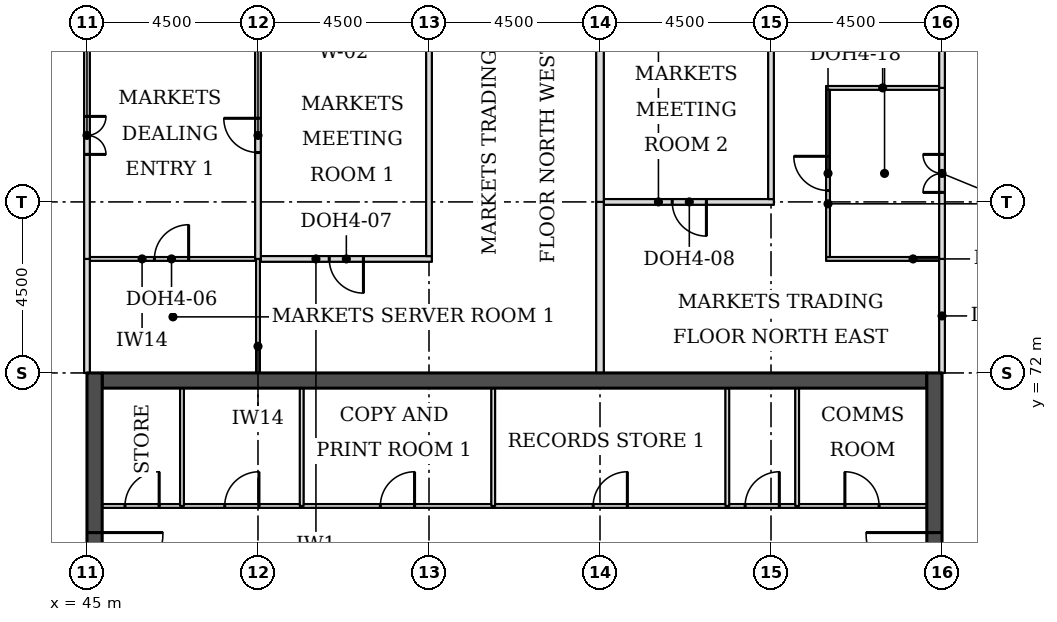
"""IFC4 building model, lengths in metres.
Left out: names, types, materials, properties, quantities, classifications, styles, units other than length and angle.
Written with IfcOpenShell. Run it as: python <this file> out.ifc"""

import sys

from ifc_helpers import new_model, si_unit, direction, frame, frame_2d, origin, place, context, subcontext, project, spatial, rectangle, extrude, element, fill, save


model = new_model("IFC4")
c1 = context("Model", 3, precision=1e-05, world=origin(), true_north=direction((0.0, 1.0)))
c2 = subcontext(c1, "Body", "Model", "MODEL_VIEW")
j1 = project(units=[si_unit("LENGTHUNIT", "METRE"), si_unit("PLANEANGLEUNIT", "RADIAN")], contexts=[c1])
p1 = place(None, origin())
s1 = spatial("IfcSite", under=j1, at=p1, CompositionType="ELEMENT")
p2 = place(p1, origin())
s2 = spatial("IfcBuilding", under=s1, at=p2, CompositionType="ELEMENT")
p3 = place(p2, frame((0.0, 0.0, 173.6)))
s3 = spatial("IfcBuildingStorey", under=s2, at=p3, CompositionType="ELEMENT", Elevation=173.6)
p4 = place(p3, frame((45.4, 71.8, 0.0), z_axis=(0.0, 0.0, 1.0), x_axis=(1.0, 0.0, 0.0)))
e1 = element("IfcWall", 1, at=p4, inside=s3, PredefinedType="SHEAR", context=c2, shape_type="SweptSolid", body=[
    extrude(rectangle(XDim=21.7, YDim=0.4, at=frame_2d((10.85, 0.0))), origin(), (0.0, 0.0, 1.0), 3.7),
])
p5 = place(p3, frame((45.2, 49.5, 0.0), z_axis=(0.0, 0.0, 1.0), x_axis=(0.0, 1.0, 0.0)))
e2 = element("IfcWall", 2, at=p5, inside=s3, PredefinedType="SHEAR", context=c2, shape_type="SweptSolid", body=[
    extrude(rectangle(XDim=22.5, YDim=0.4, at=frame_2d((11.25, 0.0))), origin(), (0.0, 0.0, 1.0), 3.7),
])
p6 = place(p5, frame((4.2, 0.0, 0.0)))
e3 = element("IfcOpeningElement", 3, at=p6, cuts=e2, PredefinedType="OPENING", context=c2, shape_type="SweptSolid", body=[
    extrude(rectangle(XDim=1.8, YDim=2.1, at=frame_2d((0.9, 1.05))), frame((0.0, 0.21, 0.0), z_axis=(0.0, -1.0, 0.0), x_axis=(1.0, 0.0, 0.0)), (0.0, 0.0, 1.0), 0.42),
])
p7 = place(p5, frame((6.9, 0.0, 0.0)))
e4 = element("IfcOpeningElement", 4, at=p7, cuts=e2, PredefinedType="OPENING", context=c2, shape_type="SweptSolid", body=[
    extrude(rectangle(XDim=1.1, YDim=2.1, at=frame_2d((0.55, 1.05))), frame((0.0, 0.21, 0.0), z_axis=(0.0, -1.0, 0.0), x_axis=(1.0, 0.0, 0.0)), (0.0, 0.0, 1.0), 0.42),
])
p8 = place(p5, frame((13.6, 0.0, 0.0)))
e5 = element("IfcOpeningElement", 5, at=p8, cuts=e2, PredefinedType="OPENING", context=c2, shape_type="SweptSolid", body=[
    extrude(rectangle(XDim=1.1, YDim=2.1, at=frame_2d((0.55, 1.05))), frame((0.0, 0.21, 0.0), z_axis=(0.0, -1.0, 0.0), x_axis=(1.0, 0.0, 0.0)), (0.0, 0.0, 1.0), 0.42),
])
p9 = place(p5, frame((16.5, 0.0, 0.0)))
e6 = element("IfcOpeningElement", 6, at=p9, cuts=e2, PredefinedType="OPENING", context=c2, shape_type="SweptSolid", body=[
    extrude(rectangle(XDim=1.8, YDim=2.1, at=frame_2d((0.9, 1.05))), frame((0.0, 0.21, 0.0), z_axis=(0.0, -1.0, 0.0), x_axis=(1.0, 0.0, 0.0)), (0.0, 0.0, 1.0), 0.42),
])
p10 = place(p3, frame((67.3, 49.5, 0.0), z_axis=(0.0, 0.0, 1.0), x_axis=(0.0, 1.0, 0.0)))
e7 = element("IfcWall", 7, at=p10, inside=s3, PredefinedType="SHEAR", context=c2, shape_type="SweptSolid", body=[
    extrude(rectangle(XDim=22.5, YDim=0.4, at=frame_2d((11.25, 0.0))), origin(), (0.0, 0.0, 1.0), 3.7),
])
p11 = place(p10, frame((4.2, 0.0, 0.0)))
e8 = element("IfcOpeningElement", 8, at=p11, cuts=e7, PredefinedType="OPENING", context=c2, shape_type="SweptSolid", body=[
    extrude(rectangle(XDim=1.8, YDim=2.1, at=frame_2d((0.9, 1.05))), frame((0.0, 0.21, 0.0), z_axis=(0.0, -1.0, 0.0), x_axis=(1.0, 0.0, 0.0)), (0.0, 0.0, 1.0), 0.42),
])
p12 = place(p10, frame((6.9, 0.0, 0.0)))
e9 = element("IfcOpeningElement", 9, at=p12, cuts=e7, PredefinedType="OPENING", context=c2, shape_type="SweptSolid", body=[
    extrude(rectangle(XDim=1.1, YDim=2.1, at=frame_2d((0.55, 1.05))), frame((0.0, 0.21, 0.0), z_axis=(0.0, -1.0, 0.0), x_axis=(1.0, 0.0, 0.0)), (0.0, 0.0, 1.0), 0.42),
])
p13 = place(p10, frame((13.6, 0.0, 0.0)))
e10 = element("IfcOpeningElement", 10, at=p13, cuts=e7, PredefinedType="OPENING", context=c2, shape_type="SweptSolid", body=[
    extrude(rectangle(XDim=1.1, YDim=2.1, at=frame_2d((0.55, 1.05))), frame((0.0, 0.21, 0.0), z_axis=(0.0, -1.0, 0.0), x_axis=(1.0, 0.0, 0.0)), (0.0, 0.0, 1.0), 0.42),
])
p14 = place(p10, frame((16.5, 0.0, 0.0)))
e11 = element("IfcOpeningElement", 11, at=p14, cuts=e7, PredefinedType="OPENING", context=c2, shape_type="SweptSolid", body=[
    extrude(rectangle(XDim=1.8, YDim=2.1, at=frame_2d((0.9, 1.05))), frame((0.0, 0.21, 0.0), z_axis=(0.0, -1.0, 0.0), x_axis=(1.0, 0.0, 0.0)), (0.0, 0.0, 1.0), 0.42),
])
p15 = place(p3, frame((45.075, 75.0, 0.0), z_axis=(0.0, 0.0, 1.0), x_axis=(1.0, 0.0, 0.0)))
e12 = element("IfcWall", 12, at=p15, inside=s3, PredefinedType="PARTITIONING", context=c2, shape_type="SweptSolid", body=[
    extrude(rectangle(XDim=4.35, YDim=0.1, at=frame_2d((2.175, 0.0))), origin(), (0.0, 0.0, 1.0), 3.55),
])
p16 = place(p15, frame((1.7, 0.0, 0.0)))
e13 = element("IfcOpeningElement", 13, at=p16, cuts=e12, PredefinedType="OPENING", context=c2, shape_type="SweptSolid", body=[
    extrude(rectangle(XDim=0.9, YDim=2.1, at=frame_2d((0.45, 1.05))), frame((0.0, 0.06, 0.0), z_axis=(0.0, -1.0, 0.0), x_axis=(1.0, 0.0, 0.0)), (0.0, 0.0, 1.0), 0.12),
])
p17 = place(p3, frame((49.575, 75.0, 0.0), z_axis=(0.0, 0.0, 1.0), x_axis=(1.0, 0.0, 0.0)))
e14 = element("IfcWall", 14, at=p17, inside=s3, PredefinedType="PARTITIONING", context=c2, shape_type="SweptSolid", body=[
    extrude(rectangle(XDim=4.5, YDim=0.15, at=frame_2d((2.25, 0.0))), origin(), (0.0, 0.0, 1.0), 3.55),
])
p18 = place(p17, frame((1.8, 0.0, 0.0)))
e15 = element("IfcOpeningElement", 15, at=p18, cuts=e14, PredefinedType="OPENING", context=c2, shape_type="SweptSolid", body=[
    extrude(rectangle(XDim=0.9, YDim=2.1, at=frame_2d((0.45, 1.05))), frame((0.0, 0.085, 0.0), z_axis=(0.0, -1.0, 0.0), x_axis=(1.0, 0.0, 0.0)), (0.0, 0.0, 1.0), 0.17),
])
p19 = place(p3, frame((64.45, 75.0, 0.0), z_axis=(0.0, 0.0, 1.0), x_axis=(1.0, 0.0, 0.0)))
e16 = element("IfcWall", 16, at=p19, inside=s3, PredefinedType="PARTITIONING", context=c2, shape_type="SweptSolid", body=[
    extrude(rectangle(XDim=2.975, YDim=0.1, at=frame_2d((1.488, 0.0))), origin(), (0.0, 0.0, 1.0), 3.55),
])
p20 = place(p3, frame((58.6, 76.5, 0.0), z_axis=(0.0, 0.0, 1.0), x_axis=(1.0, 0.0, 0.0)))
e17 = element("IfcWall", 17, at=p20, inside=s3, PredefinedType="PARTITIONING", context=c2, shape_type="SweptSolid", body=[
    extrude(rectangle(XDim=4.475, YDim=0.15, at=frame_2d((2.237, 0.0))), origin(), (0.0, 0.0, 1.0), 3.55),
])
p21 = place(p20, frame((1.8, 0.0, 0.0)))
e18 = element("IfcOpeningElement", 18, at=p21, cuts=e17, PredefinedType="OPENING", context=c2, shape_type="SweptSolid", body=[
    extrude(rectangle(XDim=0.9, YDim=2.1, at=frame_2d((0.45, 1.05))), frame((0.0, 0.085, 0.0), z_axis=(0.0, -1.0, 0.0), x_axis=(1.0, 0.0, 0.0)), (0.0, 0.0, 1.0), 0.17),
])
p22 = place(p3, frame((64.45, 79.5, 0.0), z_axis=(0.0, 0.0, 1.0), x_axis=(1.0, 0.0, 0.0)))
e19 = element("IfcWall", 19, at=p22, inside=s3, PredefinedType="PARTITIONING", context=c2, shape_type="SweptSolid", body=[
    extrude(rectangle(XDim=2.975, YDim=0.1, at=frame_2d((1.488, 0.0))), origin(), (0.0, 0.0, 1.0), 3.55),
])
p23 = place(p3, frame((45.0, 72.0, 0.0), z_axis=(0.0, 0.0, 1.0), x_axis=(0.0, 1.0, 0.0)))
e20 = element("IfcWall", 20, at=p23, inside=s3, PredefinedType="PARTITIONING", context=c2, shape_type="SweptSolid", body=[
    extrude(rectangle(XDim=3.0, YDim=0.15, at=frame_2d((1.5, 0.0))), origin(), (0.0, 0.0, 1.0), 3.022),
])
p24 = place(p3, frame((49.5, 72.0, 0.0), z_axis=(0.0, 0.0, 1.0), x_axis=(0.0, 1.0, 0.0)))
e21 = element("IfcWall", 21, at=p24, inside=s3, PredefinedType="PARTITIONING", context=c2, shape_type="SweptSolid", body=[
    extrude(rectangle(XDim=3.0, YDim=0.1, at=frame_2d((1.5, 0.0))), origin(), (0.0, 0.0, 1.0), 3.55),
])
p25 = place(p3, frame((58.5, 72.0, 0.0), z_axis=(0.0, 0.0, 1.0), x_axis=(0.0, 1.0, 0.0)))
e22 = element("IfcWall", 22, at=p25, inside=s3, PredefinedType="PARTITIONING", context=c2, shape_type="SweptSolid", body=[
    extrude(rectangle(XDim=4.5, YDim=0.2, at=frame_2d((2.25, 0.0))), origin(), (0.0, 0.0, 1.0), 3.55),
])
p26 = place(p3, frame((67.5, 72.0, 0.0), z_axis=(0.0, 0.0, 1.0), x_axis=(0.0, 1.0, 0.0)))
e23 = element("IfcWall", 23, at=p26, inside=s3, PredefinedType="PARTITIONING", context=c2, shape_type="SweptSolid", body=[
    extrude(rectangle(XDim=3.0, YDim=0.15, at=frame_2d((1.5, 0.0))), origin(), (0.0, 0.0, 1.0), 3.022),
])
p27 = place(p3, frame((45.0, 75.0, 0.0), z_axis=(0.0, 0.0, 1.0), x_axis=(0.0, 1.0, 0.0)))
e24 = element("IfcWall", 24, at=p27, inside=s3, PredefinedType="PARTITIONING", context=c2, shape_type="SweptSolid", body=[
    extrude(rectangle(XDim=6.45, YDim=0.15, at=frame_2d((3.225, 0.0))), origin(), (0.0, 0.0, 1.0), 3.022),
])
p28 = place(p27, frame((2.75, 0.0, 0.0)))
e25 = element("IfcOpeningElement", 25, at=p28, cuts=e24, PredefinedType="OPENING", context=c2, shape_type="SweptSolid", body=[
    extrude(rectangle(XDim=1.0, YDim=2.1, at=frame_2d((0.5, 1.05))), frame((0.0, 0.085, 0.0), z_axis=(0.0, -1.0, 0.0), x_axis=(1.0, 0.0, 0.0)), (0.0, 0.0, 1.0), 0.17),
])
p29 = place(p3, frame((49.5, 75.0, 0.0), z_axis=(0.0, 0.0, 1.0), x_axis=(0.0, 1.0, 0.0)))
e26 = element("IfcWall", 26, at=p29, inside=s3, PredefinedType="PARTITIONING", context=c2, shape_type="SweptSolid", body=[
    extrude(rectangle(XDim=6.45, YDim=0.15, at=frame_2d((3.225, 0.0))), origin(), (0.0, 0.0, 1.0), 3.55),
])
p30 = place(p29, frame((2.8, 0.0, 0.0)))
e27 = element("IfcOpeningElement", 27, at=p30, cuts=e26, PredefinedType="OPENING", context=c2, shape_type="SweptSolid", body=[
    extrude(rectangle(XDim=0.9, YDim=2.1, at=frame_2d((0.45, 1.05))), frame((0.0, 0.085, 0.0), z_axis=(0.0, -1.0, 0.0), x_axis=(1.0, 0.0, 0.0)), (0.0, 0.0, 1.0), 0.17),
])
p31 = place(p3, frame((67.5, 75.0, 0.0), z_axis=(0.0, 0.0, 1.0), x_axis=(0.0, 1.0, 0.0)))
e28 = element("IfcWall", 28, at=p31, inside=s3, PredefinedType="PARTITIONING", context=c2, shape_type="SweptSolid", body=[
    extrude(rectangle(XDim=4.5, YDim=0.15, at=frame_2d((2.25, 0.0))), origin(), (0.0, 0.0, 1.0), 3.022),
])
p32 = place(p31, frame((1.75, 0.0, 0.0)))
e29 = element("IfcOpeningElement", 29, at=p32, cuts=e28, PredefinedType="OPENING", context=c2, shape_type="SweptSolid", body=[
    extrude(rectangle(XDim=1.0, YDim=2.1, at=frame_2d((0.5, 1.05))), frame((0.0, 0.085, 0.0), z_axis=(0.0, -1.0, 0.0), x_axis=(1.0, 0.0, 0.0)), (0.0, 0.0, 1.0), 0.17),
])
p33 = place(p3, frame((64.5, 75.05, 0.0), z_axis=(0.0, 0.0, 1.0), x_axis=(0.0, 1.0, 0.0)))
e30 = element("IfcWall", 30, at=p33, inside=s3, PredefinedType="PARTITIONING", context=c2, shape_type="SweptSolid", body=[
    extrude(rectangle(XDim=4.4, YDim=0.1, at=frame_2d((2.2, 0.0))), origin(), (0.0, 0.0, 1.0), 3.55),
])
p34 = place(p33, frame((1.75, 0.0, 0.0)))
e31 = element("IfcOpeningElement", 31, at=p34, cuts=e30, PredefinedType="OPENING", context=c2, shape_type="SweptSolid", body=[
    extrude(rectangle(XDim=0.9, YDim=2.1, at=frame_2d((0.45, 1.05))), frame((0.0, 0.06, 0.0), z_axis=(0.0, -1.0, 0.0), x_axis=(1.0, 0.0, 0.0)), (0.0, 0.0, 1.0), 0.12),
])
p35 = place(p3, frame((54.0, 75.075, 0.0), z_axis=(0.0, 0.0, 1.0), x_axis=(0.0, 1.0, 0.0)))
e32 = element("IfcWall", 32, at=p35, inside=s3, PredefinedType="PARTITIONING", context=c2, shape_type="SweptSolid", body=[
    extrude(rectangle(XDim=6.375, YDim=0.15, at=frame_2d((3.188, 0.0))), origin(), (0.0, 0.0, 1.0), 3.55),
])
p36 = place(p3, frame((58.5, 76.5, 0.0), z_axis=(0.0, 0.0, 1.0), x_axis=(0.0, 1.0, 0.0)))
e33 = element("IfcWall", 33, at=p36, inside=s3, PredefinedType="PARTITIONING", context=c2, shape_type="SweptSolid", body=[
    extrude(rectangle(XDim=4.95, YDim=0.2, at=frame_2d((2.475, 0.0))), origin(), (0.0, 0.0, 1.0), 3.55),
])
p37 = place(p3, frame((63.0, 76.575, 0.0), z_axis=(0.0, 0.0, 1.0), x_axis=(0.0, 1.0, 0.0)))
e34 = element("IfcWall", 34, at=p37, inside=s3, PredefinedType="PARTITIONING", context=c2, shape_type="SweptSolid", body=[
    extrude(rectangle(XDim=4.875, YDim=0.15, at=frame_2d((2.438, 0.0))), origin(), (0.0, 0.0, 1.0), 3.55),
])
p38 = place(p3, frame((67.5, 79.5, 0.0), z_axis=(0.0, 0.0, 1.0), x_axis=(0.0, 1.0, 0.0)))
e35 = element("IfcWall", 35, at=p38, inside=s3, PredefinedType="PARTITIONING", context=c2, shape_type="SweptSolid", body=[
    extrude(rectangle(XDim=1.95, YDim=0.15, at=frame_2d((0.975, 0.0))), origin(), (0.0, 0.0, 1.0), 3.022),
])
p39 = place(p3, frame((45.4, 68.5, 0.0), z_axis=(0.0, 0.0, 1.0), x_axis=(1.0, 0.0, 0.0)))
e36 = element("IfcWall", 36, at=p39, inside=s3, PredefinedType="PARTITIONING", context=c2, shape_type="SweptSolid", body=[
    extrude(rectangle(XDim=21.7, YDim=0.1, at=frame_2d((10.85, 0.0))), origin(), (0.0, 0.0, 1.0), 3.55),
])
p40 = place(p39, frame((19.544, 0.0, 0.0)))
e37 = element("IfcOpeningElement", 37, at=p40, cuts=e36, PredefinedType="OPENING", context=c2, shape_type="SweptSolid", body=[
    extrude(rectangle(XDim=0.9, YDim=2.1, at=frame_2d((0.45, 1.05))), frame((0.0, 0.06, 0.0), z_axis=(0.0, -1.0, 0.0), x_axis=(1.0, 0.0, 0.0)), (0.0, 0.0, 1.0), 0.12),
])
p41 = place(p39, frame((16.919, 0.0, 0.0)))
e38 = element("IfcOpeningElement", 38, at=p41, cuts=e36, PredefinedType="OPENING", context=c2, shape_type="SweptSolid", body=[
    extrude(rectangle(XDim=0.9, YDim=2.1, at=frame_2d((0.45, 1.05))), frame((0.0, 0.06, 0.0), z_axis=(0.0, -1.0, 0.0), x_axis=(1.0, 0.0, 0.0)), (0.0, 0.0, 1.0), 0.12),
])
p42 = place(p39, frame((0.6, 0.0, 0.0)))
e39 = element("IfcOpeningElement", 39, at=p42, cuts=e36, PredefinedType="OPENING", context=c2, shape_type="SweptSolid", body=[
    extrude(rectangle(XDim=0.9, YDim=2.1, at=frame_2d((0.45, 1.05))), frame((0.0, 0.06, 0.0), z_axis=(0.0, -1.0, 0.0), x_axis=(1.0, 0.0, 0.0)), (0.0, 0.0, 1.0), 0.12),
])
p43 = place(p39, frame((3.225, 0.0, 0.0)))
e40 = element("IfcOpeningElement", 40, at=p43, cuts=e36, PredefinedType="OPENING", context=c2, shape_type="SweptSolid", body=[
    extrude(rectangle(XDim=0.9, YDim=2.1, at=frame_2d((0.45, 1.05))), frame((0.0, 0.06, 0.0), z_axis=(0.0, -1.0, 0.0), x_axis=(1.0, 0.0, 0.0)), (0.0, 0.0, 1.0), 0.12),
])
p44 = place(p39, frame((12.92, 0.0, 0.0)))
e41 = element("IfcOpeningElement", 41, at=p44, cuts=e36, PredefinedType="OPENING", context=c2, shape_type="SweptSolid", body=[
    extrude(rectangle(XDim=0.9, YDim=2.1, at=frame_2d((0.45, 1.05))), frame((0.0, 0.06, 0.0), z_axis=(0.0, -1.0, 0.0), x_axis=(1.0, 0.0, 0.0)), (0.0, 0.0, 1.0), 0.12),
])
p45 = place(p39, frame((7.32, 0.0, 0.0)))
e42 = element("IfcOpeningElement", 42, at=p45, cuts=e36, PredefinedType="OPENING", context=c2, shape_type="SweptSolid", body=[
    extrude(rectangle(XDim=0.9, YDim=2.1, at=frame_2d((0.45, 1.05))), frame((0.0, 0.06, 0.0), z_axis=(0.0, -1.0, 0.0), x_axis=(1.0, 0.0, 0.0)), (0.0, 0.0, 1.0), 0.12),
])
for number, where, z_axis, x_axis in (
    (43, (47.5, 68.5, 0.0), (0.0, 0.0, 1.0), (0.0, 1.0, 0.0)),
    (44, (50.65, 68.5, 0.0), (0.0, 0.0, 1.0), (0.0, 1.0, 0.0)),
    (45, (55.69, 68.5, 0.0), (0.0, 0.0, 1.0), (0.0, 1.0, 0.0)),
    (46, (61.85, 68.5, 0.0), (0.0, 0.0, 1.0), (0.0, 1.0, 0.0)),
    (47, (63.688, 68.5, 0.0), (0.0, 0.0, 1.0), (0.0, 1.0, 0.0)),
):
    element("IfcWall", number, at=place(p3, frame(where, z_axis=z_axis, x_axis=x_axis)), inside=s3, PredefinedType="PARTITIONING", context=c2, shape_type="SweptSolid", body=[
        extrude(rectangle(XDim=3.1, YDim=0.1, at=frame_2d((1.55, 0.0))), origin(), (0.0, 0.0, 1.0), 3.55),
    ])
p46 = place(p28, frame((1.0, 0.0, 0.0), z_axis=(0.0, 0.0, 1.0), x_axis=(-1.0, 0.0, 0.0)))
e48 = element("IfcDoor", 48, at=p46, inside=s3, OperationType="DOUBLE_DOOR_SINGLE_SWING", PredefinedType="DOOR", context=c2, shape_type="SweptSolid", body=[
    extrude(rectangle(XDim=1.0, YDim=2.1, at=frame_2d((0.5, 1.05))), frame((0.0, 0.025, 0.0), z_axis=(0.0, -1.0, 0.0), x_axis=(1.0, 0.0, 0.0)), (0.0, 0.0, 1.0), 0.05),
])
fill(e25, e48)
p47 = place(p30, origin())
e49 = element("IfcDoor", 49, at=p47, inside=s3, OperationType="SINGLE_SWING_RIGHT", PredefinedType="DOOR", context=c2, shape_type="SweptSolid", body=[
    extrude(rectangle(XDim=0.9, YDim=2.1, at=frame_2d((0.45, 1.05))), frame((0.0, 0.025, 0.0), z_axis=(0.0, -1.0, 0.0), x_axis=(1.0, 0.0, 0.0)), (0.0, 0.0, 1.0), 0.05),
])
fill(e27, e49)
p48 = place(p16, origin())
e50 = element("IfcDoor", 50, at=p48, inside=s3, OperationType="SINGLE_SWING_RIGHT", PredefinedType="DOOR", context=c2, shape_type="SweptSolid", body=[
    extrude(rectangle(XDim=0.9, YDim=2.1, at=frame_2d((0.45, 1.05))), frame((0.0, 0.025, 0.0), z_axis=(0.0, -1.0, 0.0), x_axis=(1.0, 0.0, 0.0)), (0.0, 0.0, 1.0), 0.05),
])
fill(e13, e50)
p49 = place(p18, frame((0.9, 0.0, 0.0), z_axis=(0.0, 0.0, 1.0), x_axis=(-1.0, 0.0, 0.0)))
e51 = element("IfcDoor", 51, at=p49, inside=s3, OperationType="SINGLE_SWING_LEFT", PredefinedType="DOOR", context=c2, shape_type="SweptSolid", body=[
    extrude(rectangle(XDim=0.9, YDim=2.1, at=frame_2d((0.45, 1.05))), frame((0.0, 0.025, 0.0), z_axis=(0.0, -1.0, 0.0), x_axis=(1.0, 0.0, 0.0)), (0.0, 0.0, 1.0), 0.05),
])
fill(e15, e51)
p50 = place(p32, origin())
e52 = element("IfcDoor", 52, at=p50, inside=s3, OperationType="DOUBLE_DOOR_SINGLE_SWING", PredefinedType="DOOR", context=c2, shape_type="SweptSolid", body=[
    extrude(rectangle(XDim=1.0, YDim=2.1, at=frame_2d((0.5, 1.05))), frame((0.0, 0.025, 0.0), z_axis=(0.0, -1.0, 0.0), x_axis=(1.0, 0.0, 0.0)), (0.0, 0.0, 1.0), 0.05),
])
fill(e29, e52)
p51 = place(p34, origin())
e53 = element("IfcDoor", 53, at=p51, inside=s3, OperationType="SINGLE_SWING_RIGHT", PredefinedType="DOOR", context=c2, shape_type="SweptSolid", body=[
    extrude(rectangle(XDim=0.9, YDim=2.1, at=frame_2d((0.45, 1.05))), frame((0.0, 0.025, 0.0), z_axis=(0.0, -1.0, 0.0), x_axis=(1.0, 0.0, 0.0)), (0.0, 0.0, 1.0), 0.05),
])
fill(e31, e53)
p52 = place(p21, frame((0.9, 0.0, 0.0), z_axis=(0.0, 0.0, 1.0), x_axis=(-1.0, 0.0, 0.0)))
e54 = element("IfcDoor", 54, at=p52, inside=s3, OperationType="SINGLE_SWING_LEFT", PredefinedType="DOOR", context=c2, shape_type="SweptSolid", body=[
    extrude(rectangle(XDim=0.9, YDim=2.1, at=frame_2d((0.45, 1.05))), frame((0.0, 0.025, 0.0), z_axis=(0.0, -1.0, 0.0), x_axis=(1.0, 0.0, 0.0)), (0.0, 0.0, 1.0), 0.05),
])
fill(e18, e54)
p53 = place(p9, frame((1.8, 0.0, 0.0), z_axis=(0.0, 0.0, 1.0), x_axis=(-1.0, 0.0, 0.0)))
e55 = element("IfcDoor", 55, at=p53, inside=s3, OperationType="SINGLE_SWING_LEFT", PredefinedType="DOOR", context=c2, shape_type="SweptSolid", body=[
    extrude(rectangle(XDim=1.8, YDim=2.1, at=frame_2d((0.9, 1.05))), frame((0.0, 0.025, 0.0), z_axis=(0.0, -1.0, 0.0), x_axis=(1.0, 0.0, 0.0)), (0.0, 0.0, 1.0), 0.05),
])
fill(e6, e55)
p54 = place(p14, origin())
e56 = element("IfcDoor", 56, at=p54, inside=s3, OperationType="SINGLE_SWING_RIGHT", PredefinedType="DOOR", context=c2, shape_type="SweptSolid", body=[
    extrude(rectangle(XDim=1.8, YDim=2.1, at=frame_2d((0.9, 1.05))), frame((0.0, 0.025, 0.0), z_axis=(0.0, -1.0, 0.0), x_axis=(1.0, 0.0, 0.0)), (0.0, 0.0, 1.0), 0.05),
])
fill(e11, e56)
p55 = place(p40, origin())
e57 = element("IfcDoor", 57, at=p55, inside=s3, OperationType="SINGLE_SWING_LEFT", PredefinedType="DOOR", context=c2, shape_type="SweptSolid", body=[
    extrude(rectangle(XDim=0.9, YDim=2.1, at=frame_2d((0.45, 1.05))), frame((0.0, 0.025, 0.0), z_axis=(0.0, -1.0, 0.0), x_axis=(1.0, 0.0, 0.0)), (0.0, 0.0, 1.0), 0.05),
])
fill(e37, e57)
p56 = place(p41, origin())
e58 = element("IfcDoor", 58, at=p56, inside=s3, OperationType="SINGLE_SWING_RIGHT", PredefinedType="DOOR", context=c2, shape_type="SweptSolid", body=[
    extrude(rectangle(XDim=0.9, YDim=2.1, at=frame_2d((0.45, 1.05))), frame((0.0, 0.025, 0.0), z_axis=(0.0, -1.0, 0.0), x_axis=(1.0, 0.0, 0.0)), (0.0, 0.0, 1.0), 0.05),
])
fill(e38, e58)
p57 = place(p42, origin())
e59 = element("IfcDoor", 59, at=p57, inside=s3, OperationType="SINGLE_SWING_RIGHT", PredefinedType="DOOR", context=c2, shape_type="SweptSolid", body=[
    extrude(rectangle(XDim=0.9, YDim=2.1, at=frame_2d((0.45, 1.05))), frame((0.0, 0.025, 0.0), z_axis=(0.0, -1.0, 0.0), x_axis=(1.0, 0.0, 0.0)), (0.0, 0.0, 1.0), 0.05),
])
fill(e39, e59)
p58 = place(p43, origin())
e60 = element("IfcDoor", 60, at=p58, inside=s3, OperationType="SINGLE_SWING_RIGHT", PredefinedType="DOOR", context=c2, shape_type="SweptSolid", body=[
    extrude(rectangle(XDim=0.9, YDim=2.1, at=frame_2d((0.45, 1.05))), frame((0.0, 0.025, 0.0), z_axis=(0.0, -1.0, 0.0), x_axis=(1.0, 0.0, 0.0)), (0.0, 0.0, 1.0), 0.05),
])
fill(e40, e60)
p59 = place(p44, origin())
e61 = element("IfcDoor", 61, at=p59, inside=s3, OperationType="SINGLE_SWING_RIGHT", PredefinedType="DOOR", context=c2, shape_type="SweptSolid", body=[
    extrude(rectangle(XDim=0.9, YDim=2.1, at=frame_2d((0.45, 1.05))), frame((0.0, 0.025, 0.0), z_axis=(0.0, -1.0, 0.0), x_axis=(1.0, 0.0, 0.0)), (0.0, 0.0, 1.0), 0.05),
])
fill(e41, e61)
p60 = place(p45, origin())
e62 = element("IfcDoor", 62, at=p60, inside=s3, OperationType="SINGLE_SWING_RIGHT", PredefinedType="DOOR", context=c2, shape_type="SweptSolid", body=[
    extrude(rectangle(XDim=0.9, YDim=2.1, at=frame_2d((0.45, 1.05))), frame((0.0, 0.025, 0.0), z_axis=(0.0, -1.0, 0.0), x_axis=(1.0, 0.0, 0.0)), (0.0, 0.0, 1.0), 0.05),
])
fill(e42, e62)
save(model, sys.argv[1])
